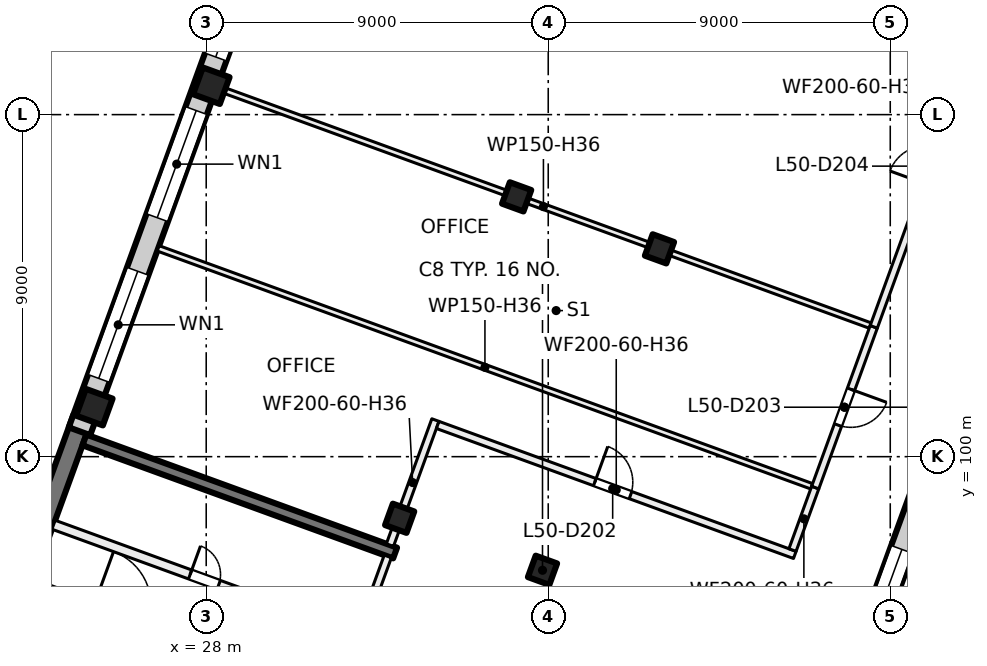
"""IFC4 building model, lengths in metres.
Left out: names, types, materials, properties, quantities, classifications, styles, units other than length and angle.
Written with IfcOpenShell. Run it as: python <this file> out.ifc"""

import sys

from ifc_helpers import new_model, si_unit, direction, frame, frame_2d, origin, origin_2d, place, context, subcontext, project, spatial, rectangle, extrude, element, fill, save


model = new_model("IFC4")
c1 = context("Model", 3, precision=1e-05, world=origin(), true_north=direction((0.0, 1.0)))
c2 = subcontext(c1, "Body", "Model", "MODEL_VIEW")
j1 = project(units=[si_unit("LENGTHUNIT", "METRE"), si_unit("PLANEANGLEUNIT", "RADIAN")], contexts=[c1])
p1 = place(None, origin())
s1 = spatial("IfcSite", under=j1, at=p1, CompositionType="ELEMENT")
p2 = place(p1, origin())
s2 = spatial("IfcBuilding", under=s1, at=p2, CompositionType="ELEMENT")
p3 = place(p2, frame((0.0, 0.0, 212.0)))
s3 = spatial("IfcBuildingStorey", under=s2, at=p3, CompositionType="ELEMENT", Elevation=212.0)
for number, where, z_axis, x_axis in (
    (1, (39.927, 105.468, 0.0), (0.0, 0.0, 1.0), (-0.342, -0.94, 0.0)),
    (2, (36.849, 97.011, 0.0), (0.0, 0.0, 1.0), (-0.342, -0.94, 0.0)),
    (3, (36.169, 106.836, 0.0), (0.0, 0.0, 1.0), (-0.342, -0.94, 0.0)),
    (4, (33.091, 98.379, 0.0), (0.0, 0.0, 1.0), (-0.342, -0.94, 0.0)),
):
    element("IfcColumn", number, at=place(p3, frame(where, z_axis=z_axis, x_axis=x_axis)), inside=s3, PredefinedType="COLUMN", context=c2, shape_type="SweptSolid", body=[
        extrude(rectangle(XDim=0.6, YDim=0.6, at=origin_2d()), origin(), (0.0, 0.0, 1.0), 4.0),
    ])
for number, where, z_axis, x_axis in (
    (5, (28.134, 109.76, 0.0), (0.0, 0.0, 1.0), (-0.342, -0.94, 0.0)),
    (6, (25.056, 101.303, 0.0), (0.0, 0.0, 1.0), (-0.342, -0.94, 0.0)),
):
    element("IfcColumn", number, at=place(p3, frame(where, z_axis=z_axis, x_axis=x_axis)), inside=s3, PredefinedType="COLUMN", context=c2, shape_type="SweptSolid", body=[
        extrude(rectangle(XDim=0.75, YDim=0.75, at=origin_2d()), origin(), (0.0, 0.0, 1.0), 4.0),
    ])
p4 = place(p3, frame((21.67, 92.585, 0.0), z_axis=(0.0, 0.0, 1.0), x_axis=(0.342035714298, 0.93968695327, 0.0)))
e7 = element("IfcWall", 7, at=p4, inside=s3, PredefinedType="SHEAR", context=c2, shape_type="SweptSolid", body=[
    extrude(rectangle(XDim=8.975, YDim=0.5, at=frame_2d((4.488, 0.0))), origin(), (0.0, 0.0, 1.0), 4.0),
])
p5 = place(p3, frame((32.971, 97.465, 0.0), z_axis=(0.0, 0.0, 1.0), x_axis=(-0.939695066972, 0.34201342241, 0.0)))
e8 = element("IfcWall", 8, at=p5, inside=s3, PredefinedType="SHEAR", context=c2, shape_type="SweptSolid", body=[
    extrude(rectangle(XDim=8.7, YDim=0.3, at=frame_2d((4.35, 0.0))), origin(), (0.0, 0.0, 1.0), 4.0),
])
p6 = place(p3, frame((51.877, 112.862, 0.0), z_axis=(0.0, 0.0, 1.0), x_axis=(-0.342020589714, -0.939692458314, 0.0)))
e9 = element("IfcWall", 9, at=p6, inside=s3, PredefinedType="SOLIDWALL", context=c2, shape_type="SweptSolid", body=[
    extrude(rectangle(XDim=20.765, YDim=0.6, at=frame_2d((10.382, 0.0))), origin(), (0.0, 0.0, 1.0), 3.625),
])
p7 = place(p6, frame((2.785, 0.0, 0.9)))
e10 = element("IfcOpeningElement", 10, at=p7, cuts=e9, PredefinedType="OPENING", context=c2, shape_type="SweptSolid", body=[
    extrude(rectangle(XDim=3.0, YDim=2.4, at=frame_2d((1.5, 1.2))), frame((0.0, 0.31, 0.0), z_axis=(0.0, -1.0, 0.0), x_axis=(1.0, 0.0, 0.0)), (0.0, 0.0, 1.0), 0.62),
])
p8 = place(p6, frame((7.285, 0.0, 0.9)))
e11 = element("IfcOpeningElement", 11, at=p8, cuts=e9, PredefinedType="OPENING", context=c2, shape_type="SweptSolid", body=[
    extrude(rectangle(XDim=3.0, YDim=2.4, at=frame_2d((1.5, 1.2))), frame((0.0, 0.31, 0.0), z_axis=(0.0, -1.0, 0.0), x_axis=(1.0, 0.0, 0.0)), (0.0, 0.0, 1.0), 0.62),
])
p9 = place(p6, frame((11.785, 0.0, 0.9)))
e12 = element("IfcOpeningElement", 12, at=p9, cuts=e9, PredefinedType="OPENING", context=c2, shape_type="SweptSolid", body=[
    extrude(rectangle(XDim=3.0, YDim=2.4, at=frame_2d((1.5, 1.2))), frame((0.0, 0.31, 0.0), z_axis=(0.0, -1.0, 0.0), x_axis=(1.0, 0.0, 0.0)), (0.0, 0.0, 1.0), 0.62),
])
p10 = place(p6, frame((16.285, 0.0, 0.9)))
e13 = element("IfcOpeningElement", 13, at=p10, cuts=e9, PredefinedType="OPENING", context=c2, shape_type="SweptSolid", body=[
    extrude(rectangle(XDim=3.0, YDim=2.4, at=frame_2d((1.5, 1.2))), frame((0.0, 0.31, 0.0), z_axis=(0.0, -1.0, 0.0), x_axis=(1.0, 0.0, 0.0)), (0.0, 0.0, 1.0), 0.62),
])
p11 = place(p3, frame((24.666, 100.669, 0.0), z_axis=(0.0, 0.0, 1.0), x_axis=(0.34201964167, 0.939692803373, 0.0)))
e14 = element("IfcWall", 14, at=p11, inside=s3, PredefinedType="SOLIDWALL", context=c2, shape_type="SweptSolid", body=[
    extrude(rectangle(XDim=32.884, YDim=0.6, at=frame_2d((16.442, 0.0))), origin(), (0.0, 0.0, 1.0), 3.625),
])
p12 = place(p11, frame((1.48, 0.0, 0.9)))
e15 = element("IfcOpeningElement", 15, at=p12, cuts=e14, PredefinedType="OPENING", context=c2, shape_type="SweptSolid", body=[
    extrude(rectangle(XDim=3.0, YDim=2.4, at=frame_2d((1.5, 1.2))), frame((0.0, 0.31, 0.0), z_axis=(0.0, -1.0, 0.0), x_axis=(1.0, 0.0, 0.0)), (0.0, 0.0, 1.0), 0.62),
])
p13 = place(p11, frame((5.98, 0.0, 0.9)))
e16 = element("IfcOpeningElement", 16, at=p13, cuts=e14, PredefinedType="OPENING", context=c2, shape_type="SweptSolid", body=[
    extrude(rectangle(XDim=3.0, YDim=2.4, at=frame_2d((1.5, 1.2))), frame((0.0, 0.31, 0.0), z_axis=(0.0, -1.0, 0.0), x_axis=(1.0, 0.0, 0.0)), (0.0, 0.0, 1.0), 0.62),
])
p14 = place(p11, frame((10.48, 0.0, 0.9)))
e17 = element("IfcOpeningElement", 17, at=p14, cuts=e14, PredefinedType="OPENING", context=c2, shape_type="SweptSolid", body=[
    extrude(rectangle(XDim=3.0, YDim=2.4, at=frame_2d((1.5, 1.2))), frame((0.0, 0.31, 0.0), z_axis=(0.0, -1.0, 0.0), x_axis=(1.0, 0.0, 0.0)), (0.0, 0.0, 1.0), 0.62),
])
p15 = place(p11, frame((14.98, 0.0, 0.9)))
e18 = element("IfcOpeningElement", 18, at=p15, cuts=e14, PredefinedType="OPENING", context=c2, shape_type="SweptSolid", body=[
    extrude(rectangle(XDim=3.0, YDim=2.4, at=frame_2d((1.5, 1.2))), frame((0.0, 0.31, 0.0), z_axis=(0.0, -1.0, 0.0), x_axis=(1.0, 0.0, 0.0)), (0.0, 0.0, 1.0), 0.62),
])
p16 = place(p11, frame((19.48, 0.0, 0.9)))
e19 = element("IfcOpeningElement", 19, at=p16, cuts=e14, PredefinedType="OPENING", context=c2, shape_type="SweptSolid", body=[
    extrude(rectangle(XDim=3.0, YDim=2.4, at=frame_2d((1.5, 1.2))), frame((0.0, 0.31, 0.0), z_axis=(0.0, -1.0, 0.0), x_axis=(1.0, 0.0, 0.0)), (0.0, 0.0, 1.0), 0.62),
])
p17 = place(p11, frame((23.98, 0.0, 0.9)))
e20 = element("IfcOpeningElement", 20, at=p17, cuts=e14, PredefinedType="OPENING", context=c2, shape_type="SweptSolid", body=[
    extrude(rectangle(XDim=3.0, YDim=2.4, at=frame_2d((1.5, 1.2))), frame((0.0, 0.31, 0.0), z_axis=(0.0, -1.0, 0.0), x_axis=(1.0, 0.0, 0.0)), (0.0, 0.0, 1.0), 0.62),
])
p18 = place(p11, frame((28.48, 0.0, 0.9)))
e21 = element("IfcOpeningElement", 21, at=p18, cuts=e14, PredefinedType="OPENING", context=c2, shape_type="SweptSolid", body=[
    extrude(rectangle(XDim=3.0, YDim=2.4, at=frame_2d((1.5, 1.2))), frame((0.0, 0.31, 0.0), z_axis=(0.0, -1.0, 0.0), x_axis=(1.0, 0.0, 0.0)), (0.0, 0.0, 1.0), 0.62),
])
p19 = place(p3, frame((31.427, 93.663, 0.0), z_axis=(0.0, 0.0, 1.0), x_axis=(0.342030870568, 0.93968871632, 0.0)))
e22 = element("IfcWall", 22, at=p19, inside=s3, PredefinedType="PARTITIONING", context=c2, shape_type="SweptSolid", body=[
    extrude(rectangle(XDim=3.95, YDim=0.2, at=frame_2d((1.975, 0.0))), origin(), (0.0, 0.0, 1.0), 3.625),
])
p20 = place(p19, frame((0.3, 0.0, 0.0)))
e23 = element("IfcOpeningElement", 23, at=p20, cuts=e22, PredefinedType="OPENING", context=c2, shape_type="SweptSolid", body=[
    extrude(rectangle(XDim=1.2, YDim=2.1, at=frame_2d((0.6, 1.05))), frame((0.0, 0.11, 0.0), z_axis=(0.0, -1.0, 0.0), x_axis=(1.0, 0.0, 0.0)), (0.0, 0.0, 1.0), 0.22),
])
p21 = place(p3, frame((23.427, 96.682, 0.0), z_axis=(0.0, 0.0, 1.0), x_axis=(0.939690465531, -0.342026064782, 0.0)))
e24 = element("IfcWall", 24, at=p21, inside=s3, PredefinedType="PARTITIONING", context=c2, shape_type="SweptSolid", body=[
    extrude(rectangle(XDim=8.45, YDim=0.2, at=frame_2d((4.225, 0.0))), origin(), (0.0, 0.0, 1.0), 3.625),
])
p22 = place(p21, frame((1.725, 0.0, 0.0)))
e25 = element("IfcOpeningElement", 25, at=p22, cuts=e24, PredefinedType="OPENING", context=c2, shape_type="SweptSolid", body=[
    extrude(rectangle(XDim=1.5, YDim=2.1, at=frame_2d((0.75, 1.05))), frame((0.0, 0.11, 0.0), z_axis=(0.0, -1.0, 0.0), x_axis=(1.0, 0.0, 0.0)), (0.0, 0.0, 1.0), 0.22),
])
p23 = place(p3, frame((23.983, 98.208, 0.0), z_axis=(0.0, 0.0, 1.0), x_axis=(0.939699751196, -0.342000552051, 0.0)))
e26 = element("IfcWall", 26, at=p23, inside=s3, PredefinedType="PARTITIONING", context=c2, shape_type="SweptSolid", body=[
    extrude(rectangle(XDim=8.45, YDim=0.25, at=frame_2d((4.225, 0.0))), origin(), (0.0, 0.0, 1.0), 3.625),
])
p24 = place(p23, frame((3.825, 0.0, 0.0)))
e27 = element("IfcOpeningElement", 27, at=p24, cuts=e26, PredefinedType="OPENING", context=c2, shape_type="SweptSolid", body=[
    extrude(rectangle(XDim=0.8, YDim=2.1, at=frame_2d((0.4, 1.05))), frame((0.0, 0.135, 0.0), z_axis=(0.0, -1.0, 0.0), x_axis=(1.0, 0.0, 0.0)), (0.0, 0.0, 1.0), 0.27),
])
p25 = place(p3, frame((26.737, 105.481, 0.0), z_axis=(0.0, 0.0, 1.0), x_axis=(0.939664418128, -0.342097619554, 0.0)))
e28 = element("IfcWall", 28, at=p25, inside=s3, PredefinedType="PARTITIONING", context=c2, shape_type="SweptSolid", body=[
    extrude(rectangle(XDim=18.299, YDim=0.15, at=frame_2d((9.149, 0.0))), origin(), (0.0, 0.0, 1.0), 3.625),
])
p26 = place(p3, frame((28.275, 109.709, 0.0), z_axis=(0.0, 0.0, 1.0), x_axis=(0.939695619185, -0.342011905181, 0.0)))
e29 = element("IfcWall", 29, at=p26, inside=s3, PredefinedType="PARTITIONING", context=c2, shape_type="SweptSolid", body=[
    extrude(rectangle(XDim=18.301, YDim=0.15, at=frame_2d((9.15, 0.0))), origin(), (0.0, 0.0, 1.0), 3.625),
])
p27 = place(p3, frame((32.834, 97.674, 0.0), z_axis=(0.0, 0.0, 1.0), x_axis=(0.342017493073, 0.939693585395, 0.0)))
e30 = element("IfcWall", 30, at=p27, inside=s3, PredefinedType="PARTITIONING", context=c2, shape_type="SweptSolid", body=[
    extrude(rectangle(XDim=3.5, YDim=0.2, at=frame_2d((1.75, 0.0))), origin(), (0.0, 0.0, 1.0), 3.625),
])
p28 = place(p3, frame((34.091, 100.835, 0.0), z_axis=(0.0, 0.0, 1.0), x_axis=(0.939702148643, -0.341993964619, 0.0)))
e31 = element("IfcWall", 31, at=p28, inside=s3, PredefinedType="PARTITIONING", context=c2, shape_type="SweptSolid", body=[
    extrude(rectangle(XDim=10.0, YDim=0.2, at=frame_2d((5.0, 0.0))), origin(), (0.0, 0.0, 1.0), 3.625),
])
p29 = place(p28, frame((4.4, 0.0, 0.0)))
e32 = element("IfcOpeningElement", 32, at=p29, cuts=e31, PredefinedType="OPENING", context=c2, shape_type="SweptSolid", body=[
    extrude(rectangle(XDim=1.0, YDim=2.1, at=frame_2d((0.5, 1.05))), frame((0.0, 0.11, 0.0), z_axis=(0.0, -1.0, 0.0), x_axis=(1.0, 0.0, 0.0)), (0.0, 0.0, 1.0), 0.22),
])
p30 = place(p3, frame((43.428, 97.543, 0.0), z_axis=(0.0, 0.0, 1.0), x_axis=(0.341776678944, 0.93978119886, 0.0)))
e33 = element("IfcWall", 33, at=p30, inside=s3, PredefinedType="PARTITIONING", context=c2, shape_type="SweptSolid", body=[
    extrude(rectangle(XDim=1.749, YDim=0.2, at=frame_2d((0.875, 0.0))), origin(), (0.0, 0.0, 1.0), 3.625),
])
p31 = place(p3, frame((44.026, 99.187, 0.0), z_axis=(0.0, 0.0, 1.0), x_axis=(0.342178571597, 0.939634942486, 0.0)))
e34 = element("IfcWall", 34, at=p31, inside=s3, PredefinedType="PARTITIONING", context=c2, shape_type="SweptSolid", body=[
    extrude(rectangle(XDim=4.501, YDim=0.2, at=frame_2d((2.25, 0.0))), origin(), (0.0, 0.0, 1.0), 3.625),
])
p32 = place(p31, frame((1.75, 0.0, 0.0)))
e35 = element("IfcOpeningElement", 35, at=p32, cuts=e34, PredefinedType="OPENING", context=c2, shape_type="SweptSolid", body=[
    extrude(rectangle(XDim=1.0, YDim=2.1, at=frame_2d((0.5, 1.05))), frame((0.0, 0.11, 0.0), z_axis=(0.0, -1.0, 0.0), x_axis=(1.0, 0.0, 0.0)), (0.0, 0.0, 1.0), 0.22),
])
p33 = place(p3, frame((45.566, 103.416, 0.0), z_axis=(0.0, 0.0, 1.0), x_axis=(0.3420218461, 0.939692001025, 0.0)))
e36 = element("IfcWall", 36, at=p33, inside=s3, PredefinedType="PARTITIONING", context=c2, shape_type="SweptSolid", body=[
    extrude(rectangle(XDim=9.0, YDim=0.2, at=frame_2d((4.5, 0.0))), origin(), (0.0, 0.0, 1.0), 3.625),
])
p34 = place(p33, frame((4.0, 0.0, 0.0)))
e37 = element("IfcOpeningElement", 37, at=p34, cuts=e36, PredefinedType="OPENING", context=c2, shape_type="SweptSolid", body=[
    extrude(rectangle(XDim=1.0, YDim=2.1, at=frame_2d((0.5, 1.05))), frame((0.0, 0.11, 0.0), z_axis=(0.0, -1.0, 0.0), x_axis=(1.0, 0.0, 0.0)), (0.0, 0.0, 1.0), 0.22),
])
p35 = place(p10, origin())
e38 = element("IfcWindow", 38, at=p35, inside=s3, PartitioningType="SINGLE_PANEL", PredefinedType="WINDOW", context=c2, shape_type="SweptSolid", body=[
    extrude(rectangle(XDim=3.0, YDim=2.4, at=frame_2d((1.5, 1.2))), frame((0.0, 0.03, 0.0), z_axis=(0.0, -1.0, 0.0), x_axis=(1.0, 0.0, 0.0)), (0.0, 0.0, 1.0), 0.06),
])
fill(e13, e38)
p36 = place(p12, origin())
e39 = element("IfcWindow", 39, at=p36, inside=s3, PartitioningType="SINGLE_PANEL", PredefinedType="WINDOW", context=c2, shape_type="SweptSolid", body=[
    extrude(rectangle(XDim=3.0, YDim=2.4, at=frame_2d((1.5, 1.2))), frame((0.0, 0.03, 0.0), z_axis=(0.0, -1.0, 0.0), x_axis=(1.0, 0.0, 0.0)), (0.0, 0.0, 1.0), 0.06),
])
fill(e15, e39)
p37 = place(p13, origin())
e40 = element("IfcWindow", 40, at=p37, inside=s3, PartitioningType="SINGLE_PANEL", PredefinedType="WINDOW", context=c2, shape_type="SweptSolid", body=[
    extrude(rectangle(XDim=3.0, YDim=2.4, at=frame_2d((1.5, 1.2))), frame((0.0, 0.03, 0.0), z_axis=(0.0, -1.0, 0.0), x_axis=(1.0, 0.0, 0.0)), (0.0, 0.0, 1.0), 0.06),
])
fill(e16, e40)
p38 = place(p14, origin())
e41 = element("IfcWindow", 41, at=p38, inside=s3, PartitioningType="SINGLE_PANEL", PredefinedType="WINDOW", context=c2, shape_type="SweptSolid", body=[
    extrude(rectangle(XDim=3.0, YDim=2.4, at=frame_2d((1.5, 1.2))), frame((0.0, 0.03, 0.0), z_axis=(0.0, -1.0, 0.0), x_axis=(1.0, 0.0, 0.0)), (0.0, 0.0, 1.0), 0.06),
])
fill(e17, e41)
p39 = place(p24, origin())
e42 = element("IfcDoor", 42, at=p39, inside=s3, OperationType="SINGLE_SWING_LEFT", PredefinedType="DOOR", context=c2, shape_type="SweptSolid", body=[
    extrude(rectangle(XDim=0.8, YDim=2.1, at=frame_2d((0.4, 1.05))), frame((0.0, 0.025, 0.0), z_axis=(0.0, -1.0, 0.0), x_axis=(1.0, 0.0, 0.0)), (0.0, 0.0, 1.0), 0.05),
])
fill(e27, e42)
p40 = place(p29, origin())
e43 = element("IfcDoor", 43, at=p40, inside=s3, OperationType="SINGLE_SWING_LEFT", PredefinedType="DOOR", context=c2, shape_type="SweptSolid", body=[
    extrude(rectangle(XDim=1.0, YDim=2.1, at=frame_2d((0.5, 1.05))), frame((0.0, 0.025, 0.0), z_axis=(0.0, -1.0, 0.0), x_axis=(1.0, 0.0, 0.0)), (0.0, 0.0, 1.0), 0.05),
])
fill(e32, e43)
p41 = place(p32, origin())
e44 = element("IfcDoor", 44, at=p41, inside=s3, OperationType="SINGLE_SWING_RIGHT", PredefinedType="DOOR", context=c2, shape_type="SweptSolid", body=[
    extrude(rectangle(XDim=1.0, YDim=2.1, at=frame_2d((0.5, 1.05))), frame((0.0, 0.025, 0.0), z_axis=(0.0, -1.0, 0.0), x_axis=(1.0, 0.0, 0.0)), (0.0, 0.0, 1.0), 0.05),
])
fill(e35, e44)
save(model, sys.argv[1])
